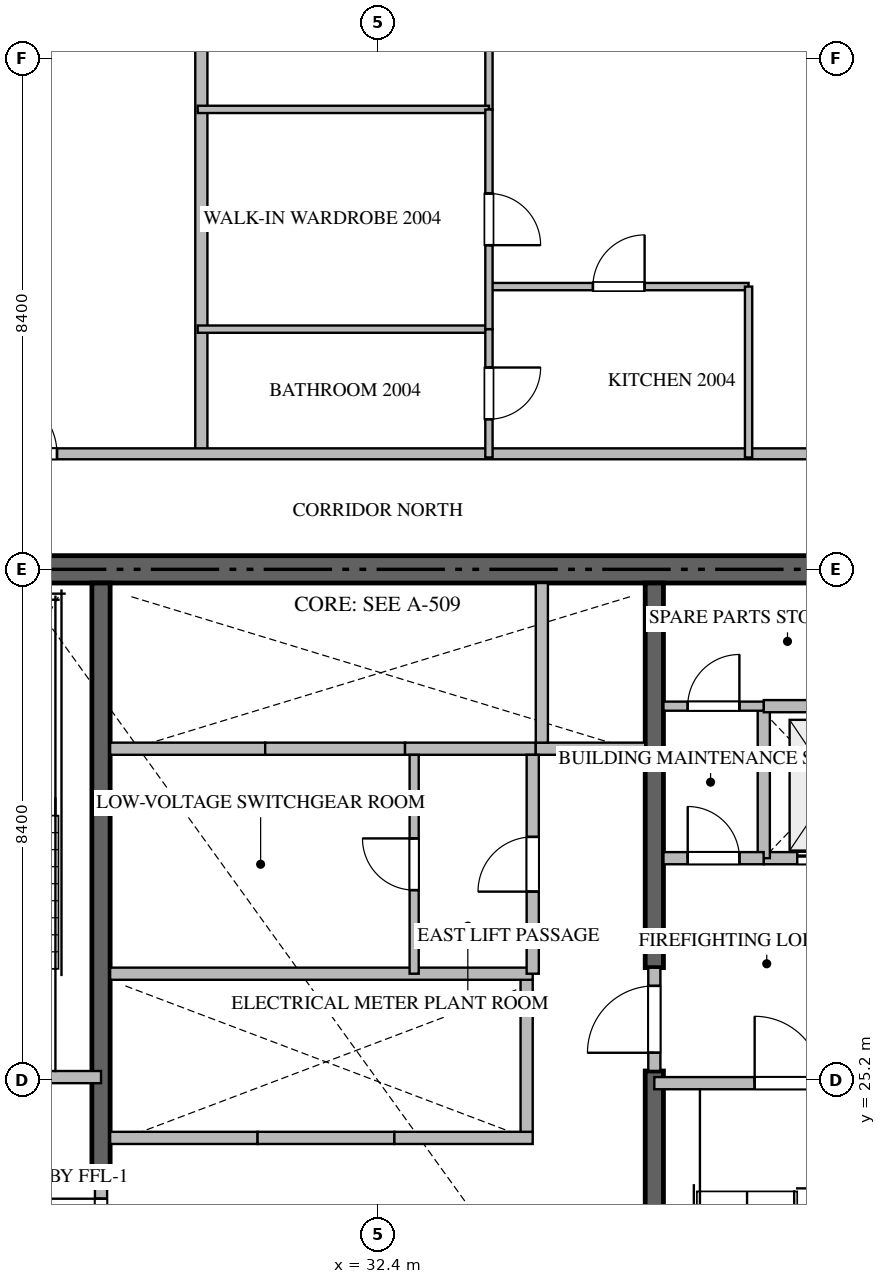
"""IFC4 building model, lengths in metres.
Left out: names, types, materials, properties, quantities, classifications, styles, units other than length and angle.
Written with IfcOpenShell. Run it as: python <this file> out.ifc"""

import sys

from ifc_helpers import new_model, si_unit, direction, frame, frame_2d, origin, place, context, subcontext, project, spatial, rectangle, extrude, source, transform, mapped, element, fill, save


model = new_model("IFC4")
c1 = context("Model", 3, precision=1e-05, world=origin(), true_north=direction((0.0, 1.0)))
c2 = subcontext(c1, "Body", "Model", "MODEL_VIEW")
j1 = project(units=[si_unit("LENGTHUNIT", "METRE"), si_unit("PLANEANGLEUNIT", "RADIAN")], contexts=[c1])
p1 = place(None, origin())
s1 = spatial("IfcSite", under=j1, at=p1, CompositionType="ELEMENT")
p2 = place(p1, origin())
s2 = spatial("IfcBuilding", under=s1, at=p2, CompositionType="ELEMENT")
p3 = place(p2, frame((0.0, 0.0, 82.95)))
s3 = spatial("IfcBuildingStorey", under=s2, at=p3, CompositionType="ELEMENT", Elevation=82.95)
p4 = place(p3, frame((41.4, 33.6, -0.26), z_axis=(0.0, 0.0, 1.0), x_axis=(-1.0, 0.0, 0.0)))
e1 = element("IfcWall", 1, at=p4, inside=s3, PredefinedType="SHEAR", context=c2, shape_type="SweptSolid", body=[
    extrude(rectangle(XDim=18.0, YDim=0.45, at=frame_2d((9.0, 0.0))), origin(), (0.0, 0.0, 1.0), 3.748),
])
p5 = place(p3, frame((27.85, 23.55, -0.26), z_axis=(0.0, 0.0, 1.0), x_axis=(0.0, 1.0, 0.0)))
e2 = element("IfcWall", 2, at=p5, inside=s3, PredefinedType="SHEAR", context=c2, shape_type="SweptSolid", body=[
    extrude(rectangle(XDim=9.825, YDim=0.3, at=frame_2d((4.913, 0.0))), origin(), (0.0, 0.0, 1.0), 3.748),
])
p6 = place(p3, frame((36.95, 17.025, -0.26), z_axis=(0.0, 0.0, 1.0), x_axis=(0.0, 1.0, 0.0)))
e3 = element("IfcWall", 3, at=p6, inside=s3, PredefinedType="SHEAR", context=c2, shape_type="SweptSolid", body=[
    extrude(rectangle(XDim=8.325, YDim=0.3, at=frame_2d((4.163, 0.0))), origin(), (0.0, 0.0, 1.0), 3.748),
])
p7 = place(p3, frame((36.95, 27.05, -0.26), z_axis=(0.0, 0.0, 1.0), x_axis=(0.0, 1.0, 0.0)))
e4 = element("IfcWall", 4, at=p7, inside=s3, PredefinedType="SHEAR", context=c2, shape_type="SweptSolid", body=[
    extrude(rectangle(XDim=6.325, YDim=0.3, at=frame_2d((3.163, 0.0))), origin(), (0.0, 0.0, 1.0), 3.748),
])
p8 = place(p3, frame((23.4, 25.25, 0.0), z_axis=(0.0, 0.0, 1.0), x_axis=(1.0, 0.0, 0.0)))
e5 = element("IfcWall", 5, at=p8, inside=s3, PredefinedType="STANDARD", context=c2, shape_type="SweptSolid", body=[
    extrude(rectangle(XDim=4.45, YDim=0.2, at=frame_2d((2.225, 0.0))), origin(), (0.0, 0.0, 1.0), 3.49),
])
p9 = place(p8, frame((1.65, 0.0, 0.0)))
e6 = element("IfcOpeningElement", 6, at=p9, cuts=e5, PredefinedType="OPENING", context=c2, shape_type="SweptSolid", body=[
    extrude(rectangle(XDim=1.1, YDim=2.15, at=frame_2d((0.55, 1.075))), frame((0.0, 0.11, 0.0), z_axis=(0.0, -1.0, 0.0), x_axis=(1.0, 0.0, 0.0)), (0.0, 0.0, 1.0), 0.22),
])
p10 = place(p3, frame((36.95, 25.15, 0.0), z_axis=(0.0, 0.0, 1.0), x_axis=(1.0, 0.0, 0.0)))
e7 = element("IfcWall", 7, at=p10, inside=s3, PredefinedType="STANDARD", context=c2, shape_type="SweptSolid", body=[
    extrude(rectangle(XDim=4.45, YDim=0.2, at=frame_2d((2.225, 0.0))), origin(), (0.0, 0.0, 1.0), 3.49),
])
p11 = place(p10, frame((1.65, 0.0, 0.0)))
e8 = element("IfcOpeningElement", 8, at=p11, cuts=e7, PredefinedType="OPENING", context=c2, shape_type="SweptSolid", body=[
    extrude(rectangle(XDim=1.1, YDim=2.15, at=frame_2d((0.55, 1.075))), frame((0.0, 0.11, 0.0), z_axis=(0.0, -1.0, 0.0), x_axis=(1.0, 0.0, 0.0)), (0.0, 0.0, 1.0), 0.22),
])
p12 = place(p3, frame((38.75, 28.85, 0.0), z_axis=(0.0, 0.0, 1.0), x_axis=(1.0, 0.0, 0.0)))
e9 = element("IfcWall", 9, at=p12, inside=s3, PredefinedType="STANDARD", context=c2, shape_type="SweptSolid", body=[
    extrude(rectangle(XDim=2.425, YDim=0.2, at=frame_2d((1.212, 0.0))), origin(), (0.0, 0.0, 1.0), 3.49),
])
p13 = place(p12, frame((0.55, 0.0, 0.0)))
e10 = element("IfcOpeningElement", 10, at=p13, cuts=e9, PredefinedType="OPENING", context=c2, shape_type="SweptSolid", body=[
    extrude(rectangle(XDim=1.2, YDim=2.2, at=frame_2d((0.6, 1.1))), frame((0.0, 0.11, 0.0), z_axis=(0.0, -1.0, 0.0), x_axis=(1.0, 0.0, 0.0)), (0.0, 0.0, 1.0), 0.22),
])
p14 = place(p3, frame((28.0, 24.25, 0.0), z_axis=(0.0, 0.0, 1.0), x_axis=(1.0, 0.0, 0.0)))
e11 = element("IfcWall", 11, at=p14, inside=s3, PredefinedType="STANDARD", context=c2, shape_type="SweptSolid", body=[
    extrude(rectangle(XDim=2.425, YDim=0.2, at=frame_2d((1.212, 0.0))), origin(), (0.0, 0.0, 1.0), 3.49),
])
p15 = place(p3, frame((30.425, 24.25, 0.0), z_axis=(0.0, 0.0, 1.0), x_axis=(1.0, 0.0, 0.0)))
e12 = element("IfcWall", 12, at=p15, inside=s3, PredefinedType="STANDARD", context=c2, shape_type="SweptSolid", body=[
    extrude(rectangle(XDim=2.25, YDim=0.2, at=frame_2d((1.125, 0.0))), origin(), (0.0, 0.0, 1.0), 3.49),
])
p16 = place(p3, frame((32.675, 24.25, 0.0), z_axis=(0.0, 0.0, 1.0), x_axis=(1.0, 0.0, 0.0)))
e13 = element("IfcWall", 13, at=p16, inside=s3, PredefinedType="STANDARD", context=c2, shape_type="SweptSolid", body=[
    extrude(rectangle(XDim=2.275, YDim=0.2, at=frame_2d((1.137, 0.0))), origin(), (0.0, 0.0, 1.0), 3.49),
])
p17 = place(p3, frame((34.85, 24.35, 0.0), z_axis=(0.0, 0.0, 1.0), x_axis=(0.0, 1.0, 0.0)))
e14 = element("IfcWall", 14, at=p17, inside=s3, PredefinedType="STANDARD", context=c2, shape_type="SweptSolid", body=[
    extrude(rectangle(XDim=2.5, YDim=0.2, at=frame_2d((1.25, 0.0))), origin(), (0.0, 0.0, 1.0), 3.49),
])
p18 = place(p3, frame((28.0, 30.65, 0.0), z_axis=(0.0, 0.0, 1.0), x_axis=(1.0, 0.0, 0.0)))
e15 = element("IfcWall", 15, at=p18, inside=s3, PredefinedType="STANDARD", context=c2, shape_type="SweptSolid", body=[
    extrude(rectangle(XDim=2.55, YDim=0.2, at=frame_2d((1.275, 0.0))), origin(), (0.0, 0.0, 1.0), 3.49),
])
p19 = place(p3, frame((30.55, 30.65, 0.0), z_axis=(0.0, 0.0, 1.0), x_axis=(1.0, 0.0, 0.0)))
e16 = element("IfcWall", 16, at=p19, inside=s3, PredefinedType="STANDARD", context=c2, shape_type="SweptSolid", body=[
    extrude(rectangle(XDim=2.3, YDim=0.2, at=frame_2d((1.15, 0.0))), origin(), (0.0, 0.0, 1.0), 3.49),
])
p20 = place(p3, frame((32.85, 30.65, 0.0), z_axis=(0.0, 0.0, 1.0), x_axis=(1.0, 0.0, 0.0)))
e17 = element("IfcWall", 17, at=p20, inside=s3, PredefinedType="STANDARD", context=c2, shape_type="SweptSolid", body=[
    extrude(rectangle(XDim=2.15, YDim=0.2, at=frame_2d((1.075, 0.0))), origin(), (0.0, 0.0, 1.0), 3.49),
])
p21 = place(p3, frame((35.0, 30.65, 0.0), z_axis=(0.0, 0.0, 1.0), x_axis=(1.0, 0.0, 0.0)))
e18 = element("IfcWall", 18, at=p21, inside=s3, PredefinedType="STANDARD", context=c2, shape_type="SweptSolid", body=[
    extrude(rectangle(XDim=1.8, YDim=0.2, at=frame_2d((0.9, 0.0))), origin(), (0.0, 0.0, 1.0), 3.49),
])
p22 = place(p3, frame((35.1, 30.75, 0.0), z_axis=(0.0, 0.0, 1.0), x_axis=(0.0, 1.0, 0.0)))
e19 = element("IfcWall", 19, at=p22, inside=s3, PredefinedType="STANDARD", context=c2, shape_type="SweptSolid", body=[
    extrude(rectangle(XDim=2.625, YDim=0.2, at=frame_2d((1.312, 0.0))), origin(), (0.0, 0.0, 1.0), 3.49),
])
p23 = place(p3, frame((38.75, 28.85, 0.0), z_axis=(0.0, 0.0, 1.0), x_axis=(0.0, 1.0, 0.0)))
e20 = element("IfcWall", 20, at=p23, inside=s3, PredefinedType="STANDARD", context=c2, shape_type="SweptSolid", body=[
    extrude(rectangle(XDim=2.5, YDim=0.2, at=frame_2d((1.25, 0.0))), origin(), (0.0, 0.0, 1.0), 3.49),
])
p24 = place(p3, frame((38.75, 31.35, 0.0), z_axis=(0.0, 0.0, 1.0), x_axis=(1.0, 0.0, 0.0)))
e21 = element("IfcWall", 21, at=p24, inside=s3, PredefinedType="STANDARD", context=c2, shape_type="SweptSolid", body=[
    extrude(rectangle(XDim=2.425, YDim=0.2, at=frame_2d((1.212, 0.0))), origin(), (0.0, 0.0, 1.0), 3.49),
])
p25 = place(p3, frame((37.1, 28.85, 0.0), z_axis=(0.0, 0.0, 1.0), x_axis=(1.0, 0.0, 0.0)))
e22 = element("IfcWall", 22, at=p25, inside=s3, PredefinedType="STANDARD", context=c2, shape_type="SweptSolid", body=[
    extrude(rectangle(XDim=1.648, YDim=0.2, at=frame_2d((0.824, 0.0))), origin(), (0.0, 0.0, 1.0), 3.49),
])
p26 = place(p25, frame((0.399, 0.0, 0.0)))
e23 = element("IfcOpeningElement", 23, at=p26, cuts=e22, PredefinedType="OPENING", context=c2, shape_type="SweptSolid", body=[
    extrude(rectangle(XDim=0.85, YDim=2.1, at=frame_2d((0.425, 1.05))), frame((0.0, 0.11, 0.0), z_axis=(0.0, -1.0, 0.0), x_axis=(1.0, 0.0, 0.0)), (0.0, 0.0, 1.0), 0.22),
])
p27 = place(p3, frame((27.85, 21.852, 0.0), z_axis=(0.0, 0.0, 1.0), x_axis=(0.0, 1.0, 0.0)))
e24 = element("IfcWall", 24, at=p27, inside=s3, PredefinedType="STANDARD", context=c2, shape_type="SweptSolid", body=[
    extrude(rectangle(XDim=1.696, YDim=0.2, at=frame_2d((0.848, 0.0))), origin(), (0.0, 0.0, 1.0), 3.49),
])
p28 = place(p27, frame((0.298, 0.0, 0.0)))
e25 = element("IfcOpeningElement", 25, at=p28, cuts=e24, PredefinedType="OPENING", context=c2, shape_type="SweptSolid", body=[
    extrude(rectangle(XDim=1.1, YDim=2.15, at=frame_2d((0.55, 1.075))), frame((0.0, 0.11, 0.0), z_axis=(0.0, -1.0, 0.0), x_axis=(1.0, 0.0, 0.0)), (0.0, 0.0, 1.0), 0.22),
])
p29 = place(p3, frame((36.95, 25.352, 0.0), z_axis=(0.0, 0.0, 1.0), x_axis=(0.0, 1.0, 0.0)))
e26 = element("IfcWall", 26, at=p29, inside=s3, PredefinedType="STANDARD", context=c2, shape_type="SweptSolid", body=[
    extrude(rectangle(XDim=1.696, YDim=0.2, at=frame_2d((0.848, 0.0))), origin(), (0.0, 0.0, 1.0), 3.49),
])
p30 = place(p29, frame((0.298, 0.0, 0.0)))
e27 = element("IfcOpeningElement", 27, at=p30, cuts=e26, PredefinedType="OPENING", context=c2, shape_type="SweptSolid", body=[
    extrude(rectangle(XDim=1.1, YDim=2.15, at=frame_2d((0.55, 1.075))), frame((0.0, 0.11, 0.0), z_axis=(0.0, -1.0, 0.0), x_axis=(1.0, 0.0, 0.0)), (0.0, 0.0, 1.0), 0.22),
])
p31 = place(p3, frame((28.0, 26.95, 0.0), z_axis=(0.0, 0.0, 1.0), x_axis=(1.0, 0.0, 0.0)))
e28 = element("IfcWall", 28, at=p31, inside=s3, PredefinedType="STANDARD", context=c2, shape_type="SweptSolid", body=[
    extrude(rectangle(XDim=6.95, YDim=0.2, at=frame_2d((3.475, 0.0))), origin(), (0.0, 0.0, 1.0), 3.49),
])
p32 = place(p3, frame((37.1, 31.35, 0.0), z_axis=(0.0, 0.0, 1.0), x_axis=(1.0, 0.0, 0.0)))
e29 = element("IfcWall", 29, at=p32, inside=s3, PredefinedType="PARTITIONING", context=c2, shape_type="SweptSolid", body=[
    extrude(rectangle(XDim=1.648, YDim=0.15, at=frame_2d((0.824, 0.0))), origin(), (0.0, 0.0, 1.0), 3.49),
])
p33 = place(p32, frame((0.399, 0.0, 0.0)))
e30 = element("IfcOpeningElement", 30, at=p33, cuts=e29, PredefinedType="OPENING", context=c2, shape_type="SweptSolid", body=[
    extrude(rectangle(XDim=0.85, YDim=2.1, at=frame_2d((0.425, 1.05))), frame((0.0, 0.085, 0.0), z_axis=(0.0, -1.0, 0.0), x_axis=(1.0, 0.0, 0.0)), (0.0, 0.0, 1.0), 0.17),
])
p34 = place(p3, frame((34.95, 26.95, 0.0), z_axis=(0.0, 0.0, 1.0), x_axis=(0.0, 1.0, 0.0)))
e31 = element("IfcWall", 31, at=p34, inside=s3, PredefinedType="STANDARD", context=c2, shape_type="SweptSolid", body=[
    extrude(rectangle(XDim=3.6, YDim=0.2, at=frame_2d((1.8, 0.0))), origin(), (0.0, 0.0, 1.0), 3.49),
])
p35 = place(p34, frame((1.35, 0.0, 0.0)))
e32 = element("IfcOpeningElement", 32, at=p35, cuts=e31, PredefinedType="OPENING", context=c2, shape_type="SweptSolid", body=[
    extrude(rectangle(XDim=0.9, YDim=2.1, at=frame_2d((0.45, 1.05))), frame((0.0, 0.11, 0.0), z_axis=(0.0, -1.0, 0.0), x_axis=(1.0, 0.0, 0.0)), (0.0, 0.0, 1.0), 0.22),
])
p36 = place(p3, frame((33.0, 26.95, 0.0), z_axis=(0.0, 0.0, 1.0), x_axis=(0.0, 1.0, 0.0)))
e33 = element("IfcWall", 33, at=p36, inside=s3, PredefinedType="PARTITIONING", context=c2, shape_type="SweptSolid", body=[
    extrude(rectangle(XDim=3.6, YDim=0.15, at=frame_2d((1.8, 0.0))), origin(), (0.0, 0.0, 1.0), 3.49),
])
p37 = place(p36, frame((1.375, 0.0, 0.0)))
e34 = element("IfcOpeningElement", 34, at=p37, cuts=e33, PredefinedType="OPENING", context=c2, shape_type="SweptSolid", body=[
    extrude(rectangle(XDim=0.85, YDim=2.1, at=frame_2d((0.425, 1.05))), frame((0.0, 0.085, 0.0), z_axis=(0.0, -1.0, 0.0), x_axis=(1.0, 0.0, 0.0)), (0.0, 0.0, 1.0), 0.17),
])
p38 = place(p3, frame((29.5, 35.5, 0.0), z_axis=(0.0, 0.0, 1.0), x_axis=(0.0, 1.0, 0.0)))
e35 = element("IfcWall", 35, at=p38, inside=s3, PredefinedType="PARTITIONING", context=c2, shape_type="SweptSolid", body=[
    extrude(rectangle(XDim=14.618, YDim=0.2, at=frame_2d((7.309, 0.0))), origin(), (0.0, 0.0, 1.0), 3.49),
])
p39 = place(p3, frame((21.402, 35.5, 0.0), z_axis=(0.0, 0.0, 1.0), x_axis=(1.0, 0.0, 0.0)))
e36 = element("IfcWall", 36, at=p39, inside=s3, PredefinedType="PARTITIONING", context=c2, shape_type="SweptSolid", body=[
    extrude(rectangle(XDim=21.996, YDim=0.18, at=frame_2d((10.998, 0.0))), origin(), (0.0, 0.0, 1.0), 3.49),
])
p40 = place(p39, frame((4.724, 0.0, 0.0)))
e37 = element("IfcOpeningElement", 37, at=p40, cuts=e36, PredefinedType="OPENING", context=c2, shape_type="SweptSolid", body=[
    extrude(rectangle(XDim=1.0, YDim=2.15, at=frame_2d((0.5, 1.075))), frame((0.0, 0.1, 0.0), z_axis=(0.0, -1.0, 0.0), x_axis=(1.0, 0.0, 0.0)), (0.0, 0.0, 1.0), 0.2),
])
p41 = place(p39, frame((18.77, 0.0, 0.0)))
e38 = element("IfcOpeningElement", 38, at=p41, cuts=e36, PredefinedType="OPENING", context=c2, shape_type="SweptSolid", body=[
    extrude(rectangle(XDim=1.0, YDim=2.15, at=frame_2d((0.5, 1.075))), frame((0.0, 0.1, 0.0), z_axis=(0.0, -1.0, 0.0), x_axis=(1.0, 0.0, 0.0)), (0.0, 0.0, 1.0), 0.2),
])
p42 = place(p3, frame((34.23, 38.25, 0.0), z_axis=(0.0, 0.0, 1.0), x_axis=(1.0, 0.0, 0.0)))
e39 = element("IfcWall", 39, at=p42, inside=s3, PredefinedType="PARTITIONING", context=c2, shape_type="SweptSolid", body=[
    extrude(rectangle(XDim=4.27, YDim=0.12, at=frame_2d((2.135, 0.0))), origin(), (0.0, 0.0, 1.0), 3.49),
])
p43 = place(p42, frame((1.71, 0.0, 0.0)))
e40 = element("IfcOpeningElement", 40, at=p43, cuts=e39, PredefinedType="OPENING", context=c2, shape_type="SweptSolid", body=[
    extrude(rectangle(XDim=0.85, YDim=2.1, at=frame_2d((0.425, 1.05))), frame((0.0, 0.07, 0.0), z_axis=(0.0, -1.0, 0.0), x_axis=(1.0, 0.0, 0.0)), (0.0, 0.0, 1.0), 0.14),
])
p44 = place(p3, frame((38.5, 38.25, 0.0), z_axis=(0.0, 0.0, 1.0), x_axis=(0.0, -1.0, 0.0)))
e41 = element("IfcWall", 41, at=p44, inside=s3, PredefinedType="PARTITIONING", context=c2, shape_type="SweptSolid", body=[
    extrude(rectangle(XDim=2.81, YDim=0.12, at=frame_2d((1.405, 0.0))), origin(), (0.0, 0.0, 1.0), 3.49),
])
p45 = place(p3, frame((34.23, 50.105, 0.0), z_axis=(0.0, 0.0, 1.0), x_axis=(0.0, -1.0, 0.0)))
e42 = element("IfcWall", 42, at=p45, inside=s3, PredefinedType="PARTITIONING", context=c2, shape_type="SweptSolid", body=[
    extrude(rectangle(XDim=8.941, YDim=0.12, at=frame_2d((4.47, 0.0))), origin(), (0.0, 0.0, 1.0), 3.49),
])
p46 = place(p45, frame((4.423, 0.0, 0.0)))
e43 = element("IfcOpeningElement", 43, at=p46, cuts=e42, PredefinedType="OPENING", context=c2, shape_type="SweptSolid", body=[
    extrude(rectangle(XDim=0.9, YDim=2.1, at=frame_2d((0.45, 1.05))), frame((0.0, 0.07, 0.0), z_axis=(0.0, -1.0, 0.0), x_axis=(1.0, 0.0, 0.0)), (0.0, 0.0, 1.0), 0.14),
])
for number, where, z_axis, x_axis in (
    (44, (29.44, 41.164, 0.0), (0.0, 0.0, 1.0), (1.0, 0.0, 0.0)),
    (45, (29.44, 37.55, 0.0), (0.0, 0.0, 1.0), (1.0, 0.0, 0.0)),
):
    element("IfcWall", number, at=place(p3, frame(where, z_axis=z_axis, x_axis=x_axis)), inside=s3, PredefinedType="PARTITIONING", context=c2, shape_type="SweptSolid", body=[
        extrude(rectangle(XDim=4.79, YDim=0.12, at=frame_2d((2.395, 0.0))), origin(), (0.0, 0.0, 1.0), 3.49),
    ])
p47 = place(p3, frame((34.23, 41.162, 0.0), z_axis=(0.0, 0.0, 1.0), x_axis=(0.0, -1.0, 0.0)))
e46 = element("IfcWall", 46, at=p47, inside=s3, PredefinedType="PARTITIONING", context=c2, shape_type="SweptSolid", body=[
    extrude(rectangle(XDim=3.612, YDim=0.12, at=frame_2d((1.806, 0.0))), origin(), (0.0, 0.0, 1.0), 3.49),
])
p48 = place(p47, frame((1.381, 0.0, 0.0)))
e47 = element("IfcOpeningElement", 47, at=p48, cuts=e46, PredefinedType="OPENING", context=c2, shape_type="SweptSolid", body=[
    extrude(rectangle(XDim=0.85, YDim=2.1, at=frame_2d((0.425, 1.05))), frame((0.0, 0.07, 0.0), z_axis=(0.0, -1.0, 0.0), x_axis=(1.0, 0.0, 0.0)), (0.0, 0.0, 1.0), 0.14),
])
p49 = place(p3, frame((34.23, 37.548, 0.0), z_axis=(0.0, 0.0, 1.0), x_axis=(0.0, -1.0, 0.0)))
e48 = element("IfcWall", 48, at=p49, inside=s3, PredefinedType="PARTITIONING", context=c2, shape_type="SweptSolid", body=[
    extrude(rectangle(XDim=2.108, YDim=0.12, at=frame_2d((1.054, 0.0))), origin(), (0.0, 0.0, 1.0), 3.49),
])
p50 = place(p49, frame((0.629, 0.0, 0.0)))
e49 = element("IfcOpeningElement", 49, at=p50, cuts=e48, PredefinedType="OPENING", context=c2, shape_type="SweptSolid", body=[
    extrude(rectangle(XDim=0.85, YDim=2.1, at=frame_2d((0.425, 1.05))), frame((0.0, 0.07, 0.0), z_axis=(0.0, -1.0, 0.0), x_axis=(1.0, 0.0, 0.0)), (0.0, 0.0, 1.0), 0.14),
])
m1 = source(origin(), c2, "Body", "SweptSolid", [
    extrude(rectangle(XDim=1.1, YDim=2.15, at=frame_2d((0.55, 1.075))), frame((0.0, 0.025, 0.0), z_axis=(0.0, -1.0, 0.0), x_axis=(1.0, 0.0, 0.0)), (0.0, 0.0, 1.0), 0.05),
])
p51 = place(p11, origin())
e50 = element("IfcDoor", 50, at=p51, inside=s3, OperationType="SINGLE_SWING_LEFT", PredefinedType="DOOR", context=c2, shape_type="MappedRepresentation", body=[
    mapped(m1, transform((0.0, 0.0, 0.0), scale=1.0)),
])
fill(e8, e50)
m2 = source(origin(), c2, "Body", "SweptSolid", [
    extrude(rectangle(XDim=1.2, YDim=2.2, at=frame_2d((0.6, 1.1))), frame((0.0, 0.025, 0.0), z_axis=(0.0, -1.0, 0.0), x_axis=(1.0, 0.0, 0.0)), (0.0, 0.0, 1.0), 0.05),
])
p52 = place(p13, origin())
e51 = element("IfcDoor", 51, at=p52, inside=s3, OperationType="DOUBLE_DOOR_SLIDING", PredefinedType="DOOR", context=c2, shape_type="MappedRepresentation", body=[
    mapped(m2, transform((0.0, 0.0, 0.0), scale=1.0)),
])
fill(e10, e51)
m3 = source(origin(), c2, "Body", "SweptSolid", [
    extrude(rectangle(XDim=0.85, YDim=2.1, at=frame_2d((0.425, 1.05))), frame((0.0, 0.025, 0.0), z_axis=(0.0, -1.0, 0.0), x_axis=(1.0, 0.0, 0.0)), (0.0, 0.0, 1.0), 0.05),
])
p53 = place(p26, origin())
e52 = element("IfcDoor", 52, at=p53, inside=s3, OperationType="SINGLE_SWING_LEFT", PredefinedType="DOOR", context=c2, shape_type="MappedRepresentation", body=[
    mapped(m3, transform((0.0, 0.0, 0.0), scale=1.0)),
])
fill(e23, e52)
p54 = place(p28, origin())
e53 = element("IfcDoor", 53, at=p54, inside=s3, OperationType="SINGLE_SWING_RIGHT", PredefinedType="DOOR", context=c2, shape_type="MappedRepresentation", body=[
    mapped(m1, transform((0.0, 0.0, 0.0), scale=1.0)),
])
fill(e25, e53)
p55 = place(p30, origin())
e54 = element("IfcDoor", 54, at=p55, inside=s3, OperationType="SINGLE_SWING_LEFT", PredefinedType="DOOR", context=c2, shape_type="MappedRepresentation", body=[
    mapped(m1, transform((0.0, 0.0, 0.0), scale=1.0)),
])
fill(e27, e54)
p56 = place(p33, origin())
e55 = element("IfcDoor", 55, at=p56, inside=s3, OperationType="SINGLE_SWING_RIGHT", PredefinedType="DOOR", context=c2, shape_type="MappedRepresentation", body=[
    mapped(m3, transform((0.0, 0.0, 0.0), scale=1.0)),
])
fill(e30, e55)
m4 = source(origin(), c2, "Body", "SweptSolid", [
    extrude(rectangle(XDim=0.9, YDim=2.1, at=frame_2d((0.45, 1.05))), frame((0.0, 0.025, 0.0), z_axis=(0.0, -1.0, 0.0), x_axis=(1.0, 0.0, 0.0)), (0.0, 0.0, 1.0), 0.05),
])
p57 = place(p35, origin())
e56 = element("IfcDoor", 56, at=p57, inside=s3, OperationType="SINGLE_SWING_LEFT", PredefinedType="DOOR", context=c2, shape_type="MappedRepresentation", body=[
    mapped(m4, transform((0.0, 0.0, 0.0), scale=1.0)),
])
fill(e32, e56)
p58 = place(p37, origin())
e57 = element("IfcDoor", 57, at=p58, inside=s3, OperationType="SINGLE_SWING_RIGHT", PredefinedType="DOOR", context=c2, shape_type="MappedRepresentation", body=[
    mapped(m3, transform((0.0, 0.0, 0.0), scale=1.0)),
])
fill(e34, e57)
m5 = source(origin(), c2, "Body", "SweptSolid", [
    extrude(rectangle(XDim=1.0, YDim=2.15, at=frame_2d((0.5, 1.075))), frame((0.0, 0.025, 0.0), z_axis=(0.0, -1.0, 0.0), x_axis=(1.0, 0.0, 0.0)), (0.0, 0.0, 1.0), 0.05),
])
p59 = place(p40, origin())
e58 = element("IfcDoor", 58, at=p59, inside=s3, OperationType="SINGLE_SWING_LEFT", PredefinedType="DOOR", context=c2, shape_type="MappedRepresentation", body=[
    mapped(m5, transform((0.0, 0.0, 0.0), scale=1.0)),
])
fill(e37, e58)
p60 = place(p43, origin())
e59 = element("IfcDoor", 59, at=p60, inside=s3, OperationType="SINGLE_SWING_RIGHT", PredefinedType="DOOR", context=c2, shape_type="MappedRepresentation", body=[
    mapped(m3, transform((0.0, 0.0, 0.0), scale=1.0)),
])
fill(e40, e59)
p61 = place(p48, origin())
e60 = element("IfcDoor", 60, at=p61, inside=s3, OperationType="SINGLE_SWING_RIGHT", PredefinedType="DOOR", context=c2, shape_type="MappedRepresentation", body=[
    mapped(m3, transform((0.0, 0.0, 0.0), scale=1.0)),
])
fill(e47, e60)
p62 = place(p50, origin())
e61 = element("IfcDoor", 61, at=p62, inside=s3, OperationType="SINGLE_SWING_LEFT", PredefinedType="DOOR", context=c2, shape_type="MappedRepresentation", body=[
    mapped(m3, transform((0.0, 0.0, 0.0), scale=1.0)),
])
fill(e49, e61)
save(model, sys.argv[1])
